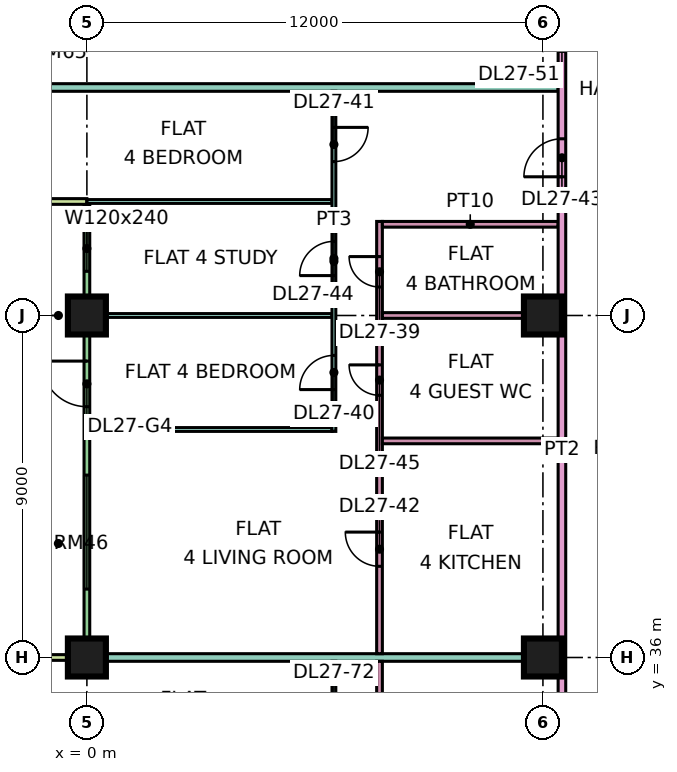
"""IFC4 building model, lengths in metres.
Left out: names, types, materials, properties, quantities, classifications, styles, units other than length and angle.
Written with IfcOpenShell. Run it as: python <this file> out.ifc"""

import sys

from ifc_helpers import new_model, si_unit, direction, frame, frame_2d, origin, origin_2d, place, context, subcontext, project, spatial, rectangle, extrude, element, fill, save


model = new_model("IFC4")
c1 = context("Model", 3, precision=1e-05, world=origin(), true_north=direction((0.0, 1.0)))
c2 = subcontext(c1, "Body", "Model", "MODEL_VIEW")
j1 = project(units=[si_unit("LENGTHUNIT", "METRE"), si_unit("PLANEANGLEUNIT", "RADIAN")], contexts=[c1])
p1 = place(None, origin())
s1 = spatial("IfcSite", under=j1, at=p1, CompositionType="ELEMENT")
p2 = place(p1, origin())
s2 = spatial("IfcBuilding", under=s1, at=p2, CompositionType="ELEMENT")
p3 = place(p2, frame((0.0, 0.0, 118.15)))
s3 = spatial("IfcBuildingStorey", under=s2, at=p3, CompositionType="ELEMENT", Elevation=118.15)
p4 = place(p3, frame((0.0, 36.0, 0.0), z_axis=(0.0, 0.0, 1.0), x_axis=(1.0, 0.0, 0.0)))
e1 = element("IfcColumn", 1, at=p4, inside=s3, PredefinedType="COLUMN", context=c2, shape_type="SweptSolid", body=[
    extrude(rectangle(XDim=1.0, YDim=1.0, at=origin_2d()), origin(), (0.0, 0.0, 1.0), 3.75),
])
for number, where, z_axis, x_axis in (
    (2, (0.0, 45.0, 0.0), (0.0, 0.0, 1.0), (1.0, 0.0, 0.0)),
    (3, (12.0, 36.0, 0.0), (0.0, 0.0, 1.0), (1.0, 0.0, 0.0)),
    (4, (12.0, 45.0, 0.0), (0.0, 0.0, 1.0), (1.0, 0.0, 0.0)),
):
    element("IfcColumn", number, at=place(p3, frame(where, z_axis=z_axis, x_axis=x_axis)), inside=s3, PredefinedType="COLUMN", context=c2, shape_type="SweptSolid", body=[
        extrude(rectangle(XDim=1.0, YDim=1.0, at=origin_2d()), origin(), (0.0, 0.0, 1.0), 3.75),
    ])
p5 = place(p3, frame((0.0, 47.925, 0.0), z_axis=(0.0, 0.0, 1.0), x_axis=(0.0, -1.0, 0.0)))
e5 = element("IfcWall", 5, at=p5, inside=s3, PredefinedType="SOLIDWALL", context=c2, shape_type="SweptSolid", body=[
    extrude(rectangle(XDim=11.85, YDim=0.15, at=frame_2d((5.925, 0.0))), origin(), (0.0, 0.0, 1.0), 3.35),
])
p6 = place(p5, frame((0.562, 0.0, 0.45)))
e6 = element("IfcOpeningElement", 6, at=p6, cuts=e5, PredefinedType="OPENING", context=c2, shape_type="SweptSolid", body=[
    extrude(rectangle(XDim=1.2, YDim=2.4, at=frame_2d((0.6, 1.2))), frame((0.0, 0.085, 0.0), z_axis=(0.0, -1.0, 0.0), x_axis=(1.0, 0.0, 0.0)), (0.0, 0.0, 1.0), 0.17),
])
p7 = place(p5, frame((4.125, 0.0, 0.0)))
e7 = element("IfcOpeningElement", 7, at=p7, cuts=e5, PredefinedType="OPENING", context=c2, shape_type="SweptSolid", body=[
    extrude(rectangle(XDim=1.2, YDim=2.4, at=frame_2d((0.6, 1.2))), frame((0.0, 0.085, 0.0), z_axis=(0.0, -1.0, 0.0), x_axis=(1.0, 0.0, 0.0)), (0.0, 0.0, 1.0), 0.17),
])
p8 = place(p5, frame((7.125, 0.0, 0.45)))
e8 = element("IfcOpeningElement", 8, at=p8, cuts=e5, PredefinedType="OPENING", context=c2, shape_type="SweptSolid", body=[
    extrude(rectangle(XDim=3.0, YDim=2.4, at=frame_2d((1.5, 1.2))), frame((0.0, 0.085, 0.0), z_axis=(0.0, -1.0, 0.0), x_axis=(1.0, 0.0, 0.0)), (0.0, 0.0, 1.0), 0.17),
])
for number, where, z_axis, x_axis in (
    (9, (-1.5, 48.0, 0.0), (0.0, 0.0, 1.0), (1.0, 0.0, 0.0)),
    (10, (-1.5, 36.0, 0.0), (0.0, 0.0, 1.0), (1.0, 0.0, 0.0)),
):
    element("IfcWall", number, at=place(p3, frame(where, z_axis=z_axis, x_axis=x_axis)), inside=s3, PredefinedType="SOLIDWALL", context=c2, shape_type="SweptSolid", body=[
        extrude(rectangle(XDim=1.5, YDim=0.15, at=frame_2d((0.75, 0.0))), origin(), (0.0, 0.0, 1.0), 3.35),
    ])
e11 = element("IfcWall", 11, at=p4, inside=s3, PredefinedType="PARTITIONING", context=c2, shape_type="SweptSolid", body=[
    extrude(rectangle(XDim=12.4, YDim=0.2, at=frame_2d((6.2, 0.0))), origin(), (0.0, 0.0, 1.0), 3.35),
])
p9 = place(p3, frame((0.0, 48.0, 0.0), z_axis=(0.0, 0.0, 1.0), x_axis=(1.0, 0.0, 0.0)))
e12 = element("IfcWall", 12, at=p9, inside=s3, PredefinedType="PARTITIONING", context=c2, shape_type="SweptSolid", body=[
    extrude(rectangle(XDim=6.45, YDim=0.1, at=frame_2d((3.225, 0.0))), origin(), (0.0, 0.0, 1.0), 3.35),
])
p10 = place(p3, frame((-1.35, 51.0, 0.0), z_axis=(0.0, 0.0, 1.0), x_axis=(1.0, 0.0, 0.0)))
e13 = element("IfcWall", 13, at=p10, inside=s3, PredefinedType="PARTITIONING", context=c2, shape_type="SweptSolid", body=[
    extrude(rectangle(XDim=13.75, YDim=0.2, at=frame_2d((6.875, 0.0))), origin(), (0.0, 0.0, 1.0), 3.35),
])
for number, where, z_axis, x_axis in (
    (14, (0.074, 42.0, 0.0), (0.0, 0.0, 1.0), (1.0, 0.0, 0.0)),
    (15, (0.074, 45.0, 0.0), (0.0, 0.0, 1.0), (1.0, 0.0, 0.0)),
):
    element("IfcWall", number, at=place(p3, frame(where, z_axis=z_axis, x_axis=x_axis)), inside=s3, PredefinedType="PARTITIONING", context=c2, shape_type="SweptSolid", body=[
        extrude(rectangle(XDim=6.376, YDim=0.1, at=frame_2d((3.188, 0.0))), origin(), (0.0, 0.0, 1.0), 3.35),
    ])
p11 = place(p3, frame((6.5, 30.05, 0.0), z_axis=(0.0, 0.0, 1.0), x_axis=(0.0, 1.0, 0.0)))
e16 = element("IfcWall", 16, at=p11, inside=s3, PredefinedType="PARTITIONING", context=c2, shape_type="SweptSolid", body=[
    extrude(rectangle(XDim=5.85, YDim=0.1, at=frame_2d((2.925, 0.0))), origin(), (0.0, 0.0, 1.0), 3.35),
])
p12 = place(p11, frame((1.0, 0.0, 0.0)))
e17 = element("IfcOpeningElement", 17, at=p12, cuts=e16, PredefinedType="OPENING", context=c2, shape_type="SweptSolid", body=[
    extrude(rectangle(XDim=0.9, YDim=2.1, at=frame_2d((0.45, 1.05))), frame((0.0, 0.06, 0.0), z_axis=(0.0, -1.0, 0.0), x_axis=(1.0, 0.0, 0.0)), (0.0, 0.0, 1.0), 0.12),
])
p13 = place(p11, frame((4.0, 0.0, 0.0)))
e18 = element("IfcOpeningElement", 18, at=p13, cuts=e16, PredefinedType="OPENING", context=c2, shape_type="SweptSolid", body=[
    extrude(rectangle(XDim=0.9, YDim=2.1, at=frame_2d((0.45, 1.05))), frame((0.0, 0.06, 0.0), z_axis=(0.0, -1.0, 0.0), x_axis=(1.0, 0.0, 0.0)), (0.0, 0.0, 1.0), 0.12),
])
p14 = place(p3, frame((6.5, 41.95, 0.0), z_axis=(0.0, 0.0, 1.0), x_axis=(0.0, 1.0, 0.0)))
e19 = element("IfcWall", 19, at=p14, inside=s3, PredefinedType="PARTITIONING", context=c2, shape_type="SweptSolid", body=[
    extrude(rectangle(XDim=8.95, YDim=0.1, at=frame_2d((4.475, 0.0))), origin(), (0.0, 0.0, 1.0), 3.35),
])
p15 = place(p14, frame((1.1, 0.0, 0.0)))
e20 = element("IfcOpeningElement", 20, at=p15, cuts=e19, PredefinedType="OPENING", context=c2, shape_type="SweptSolid", body=[
    extrude(rectangle(XDim=0.9, YDim=2.1, at=frame_2d((0.45, 1.05))), frame((0.0, 0.06, 0.0), z_axis=(0.0, -1.0, 0.0), x_axis=(1.0, 0.0, 0.0)), (0.0, 0.0, 1.0), 0.12),
])
p16 = place(p14, frame((7.1, 0.0, 0.0)))
e21 = element("IfcOpeningElement", 21, at=p16, cuts=e19, PredefinedType="OPENING", context=c2, shape_type="SweptSolid", body=[
    extrude(rectangle(XDim=0.9, YDim=2.1, at=frame_2d((0.45, 1.05))), frame((0.0, 0.06, 0.0), z_axis=(0.0, -1.0, 0.0), x_axis=(1.0, 0.0, 0.0)), (0.0, 0.0, 1.0), 0.12),
])
p17 = place(p14, frame((4.1, 0.0, 0.0)))
e22 = element("IfcOpeningElement", 22, at=p17, cuts=e19, PredefinedType="OPENING", context=c2, shape_type="SweptSolid", body=[
    extrude(rectangle(XDim=0.9, YDim=2.1, at=frame_2d((0.45, 1.05))), frame((0.0, 0.06, 0.0), z_axis=(0.0, -1.0, 0.0), x_axis=(1.0, 0.0, 0.0)), (0.0, 0.0, 1.0), 0.12),
])
p18 = place(p3, frame((7.7, 26.625, 0.0), z_axis=(0.0, 0.0, 1.0), x_axis=(0.0, 1.0, 0.0)))
e23 = element("IfcWall", 23, at=p18, inside=s3, PredefinedType="PARTITIONING", context=c2, shape_type="SweptSolid", body=[
    extrude(rectangle(XDim=9.275, YDim=0.15, at=frame_2d((4.637, 0.0))), origin(), (0.0, 0.0, 1.0), 3.35),
])
p19 = place(p18, frame((1.275, 0.0, 0.0)))
e24 = element("IfcOpeningElement", 24, at=p19, cuts=e23, PredefinedType="OPENING", context=c2, shape_type="SweptSolid", body=[
    extrude(rectangle(XDim=0.8, YDim=2.1, at=frame_2d((0.4, 1.05))), frame((0.0, 0.085, 0.0), z_axis=(0.0, -1.0, 0.0), x_axis=(1.0, 0.0, 0.0)), (0.0, 0.0, 1.0), 0.17),
])
p20 = place(p18, frame((5.925, 0.0, 0.0)))
e25 = element("IfcOpeningElement", 25, at=p20, cuts=e23, PredefinedType="OPENING", context=c2, shape_type="SweptSolid", body=[
    extrude(rectangle(XDim=0.9, YDim=2.1, at=frame_2d((0.45, 1.05))), frame((0.0, 0.085, 0.0), z_axis=(0.0, -1.0, 0.0), x_axis=(1.0, 0.0, 0.0)), (0.0, 0.0, 1.0), 0.17),
])
p21 = place(p3, frame((7.7, 36.1, 0.0), z_axis=(0.0, 0.0, 1.0), x_axis=(0.0, 1.0, 0.0)))
e26 = element("IfcWall", 26, at=p21, inside=s3, PredefinedType="PARTITIONING", context=c2, shape_type="SweptSolid", body=[
    extrude(rectangle(XDim=11.375, YDim=0.15, at=frame_2d((5.688, 0.0))), origin(), (0.0, 0.0, 1.0), 3.35),
])
p22 = place(p21, frame((9.65, 0.0, 0.0)))
e27 = element("IfcOpeningElement", 27, at=p22, cuts=e26, PredefinedType="OPENING", context=c2, shape_type="SweptSolid", body=[
    extrude(rectangle(XDim=0.8, YDim=2.1, at=frame_2d((0.4, 1.05))), frame((0.0, 0.085, 0.0), z_axis=(0.0, -1.0, 0.0), x_axis=(1.0, 0.0, 0.0)), (0.0, 0.0, 1.0), 0.17),
])
p23 = place(p21, frame((2.3, 0.0, 0.0)))
e28 = element("IfcOpeningElement", 28, at=p23, cuts=e26, PredefinedType="OPENING", context=c2, shape_type="SweptSolid", body=[
    extrude(rectangle(XDim=0.9, YDim=2.1, at=frame_2d((0.45, 1.05))), frame((0.0, 0.085, 0.0), z_axis=(0.0, -1.0, 0.0), x_axis=(1.0, 0.0, 0.0)), (0.0, 0.0, 1.0), 0.17),
])
p24 = place(p21, frame((6.8, 0.0, 0.0)))
e29 = element("IfcOpeningElement", 29, at=p24, cuts=e26, PredefinedType="OPENING", context=c2, shape_type="SweptSolid", body=[
    extrude(rectangle(XDim=0.8, YDim=2.1, at=frame_2d((0.4, 1.05))), frame((0.0, 0.085, 0.0), z_axis=(0.0, -1.0, 0.0), x_axis=(1.0, 0.0, 0.0)), (0.0, 0.0, 1.0), 0.17),
])
for number, where, z_axis, x_axis in (
    (30, (7.775, 41.7, 0.0), (0.0, 0.0, 1.0), (1.0, 0.0, 0.0)),
    (31, (7.775, 45.0, 0.0), (0.0, 0.0, 1.0), (1.0, 0.0, 0.0)),
    (32, (7.775, 47.4, 0.0), (0.0, 0.0, 1.0), (1.0, 0.0, 0.0)),
):
    element("IfcWall", number, at=place(p3, frame(where, z_axis=z_axis, x_axis=x_axis)), inside=s3, PredefinedType="PARTITIONING", context=c2, shape_type="SweptSolid", body=[
        extrude(rectangle(XDim=4.625, YDim=0.15, at=frame_2d((2.312, 0.0))), origin(), (0.0, 0.0, 1.0), 3.35),
    ])
p25 = place(p3, frame((12.5, 20.0, 0.0), z_axis=(0.0, 0.0, 1.0), x_axis=(0.0, 1.0, 0.0)))
e33 = element("IfcWall", 33, at=p25, inside=s3, PredefinedType="PARTITIONING", context=c2, shape_type="SweptSolid", body=[
    extrude(rectangle(XDim=42.926, YDim=0.2, at=frame_2d((21.463, 0.0))), origin(), (0.0, 0.0, 1.0), 3.35),
])
p26 = place(p25, frame((28.65, 0.0, 0.0)))
e34 = element("IfcOpeningElement", 34, at=p26, cuts=e33, PredefinedType="OPENING", context=c2, shape_type="SweptSolid", body=[
    extrude(rectangle(XDim=1.0, YDim=2.1, at=frame_2d((0.5, 1.05))), frame((0.0, 0.11, 0.0), z_axis=(0.0, -1.0, 0.0), x_axis=(1.0, 0.0, 0.0)), (0.0, 0.0, 1.0), 0.22),
])
p27 = place(p25, frame((31.95, 0.0, 0.0)))
e35 = element("IfcOpeningElement", 35, at=p27, cuts=e33, PredefinedType="OPENING", context=c2, shape_type="SweptSolid", body=[
    extrude(rectangle(XDim=1.0, YDim=2.1, at=frame_2d((0.5, 1.05))), frame((0.0, 0.11, 0.0), z_axis=(0.0, -1.0, 0.0), x_axis=(1.0, 0.0, 0.0)), (0.0, 0.0, 1.0), 0.22),
])
p28 = place(p25, frame((0.6, 0.0, 0.0)))
e36 = element("IfcOpeningElement", 36, at=p28, cuts=e33, PredefinedType="OPENING", context=c2, shape_type="SweptSolid", body=[
    extrude(rectangle(XDim=1.2, YDim=2.1, at=frame_2d((0.6, 1.05))), frame((0.0, 0.11, 0.0), z_axis=(0.0, -1.0, 0.0), x_axis=(1.0, 0.0, 0.0)), (0.0, 0.0, 1.0), 0.22),
])
p29 = place(p25, frame((4.65, 0.0, 0.0)))
e37 = element("IfcOpeningElement", 37, at=p29, cuts=e33, PredefinedType="OPENING", context=c2, shape_type="SweptSolid", body=[
    extrude(rectangle(XDim=1.0, YDim=2.1, at=frame_2d((0.5, 1.05))), frame((0.0, 0.11, 0.0), z_axis=(0.0, -1.0, 0.0), x_axis=(1.0, 0.0, 0.0)), (0.0, 0.0, 1.0), 0.22),
])
p30 = place(p6, origin())
e38 = element("IfcWindow", 38, at=p30, inside=s3, PartitioningType="SINGLE_PANEL", PredefinedType="WINDOW", context=c2, shape_type="SweptSolid", body=[
    extrude(rectangle(XDim=1.2, YDim=2.4, at=frame_2d((0.6, 1.2))), frame((0.0, 0.03, 0.0), z_axis=(0.0, -1.0, 0.0), x_axis=(1.0, 0.0, 0.0)), (0.0, 0.0, 1.0), 0.06),
])
fill(e6, e38)
p31 = place(p7, frame((1.2, 0.0, 0.0), z_axis=(0.0, 0.0, 1.0), x_axis=(-1.0, 0.0, 0.0)))
e39 = element("IfcDoor", 39, at=p31, inside=s3, OperationType="DOUBLE_DOOR_SINGLE_SWING", PredefinedType="DOOR", context=c2, shape_type="SweptSolid", body=[
    extrude(rectangle(XDim=1.2, YDim=2.4, at=frame_2d((0.6, 1.2))), frame((0.0, 0.025, 0.0), z_axis=(0.0, -1.0, 0.0), x_axis=(1.0, 0.0, 0.0)), (0.0, 0.0, 1.0), 0.05),
])
fill(e7, e39)
p32 = place(p8, origin())
e40 = element("IfcWindow", 40, at=p32, inside=s3, PartitioningType="SINGLE_PANEL", PredefinedType="WINDOW", context=c2, shape_type="SweptSolid", body=[
    extrude(rectangle(XDim=3.0, YDim=2.4, at=frame_2d((1.5, 1.2))), frame((0.0, 0.03, 0.0), z_axis=(0.0, -1.0, 0.0), x_axis=(1.0, 0.0, 0.0)), (0.0, 0.0, 1.0), 0.06),
])
fill(e8, e40)
p33 = place(p22, frame((0.8, 0.0, 0.0), z_axis=(0.0, 0.0, 1.0), x_axis=(-1.0, 0.0, 0.0)))
e41 = element("IfcDoor", 41, at=p33, inside=s3, OperationType="SINGLE_SWING_RIGHT", PredefinedType="DOOR", context=c2, shape_type="SweptSolid", body=[
    extrude(rectangle(XDim=0.8, YDim=2.1, at=frame_2d((0.4, 1.05))), frame((0.0, 0.025, 0.0), z_axis=(0.0, -1.0, 0.0), x_axis=(1.0, 0.0, 0.0)), (0.0, 0.0, 1.0), 0.05),
])
fill(e27, e41)
p34 = place(p15, origin())
e42 = element("IfcDoor", 42, at=p34, inside=s3, OperationType="SINGLE_SWING_LEFT", PredefinedType="DOOR", context=c2, shape_type="SweptSolid", body=[
    extrude(rectangle(XDim=0.9, YDim=2.1, at=frame_2d((0.45, 1.05))), frame((0.0, 0.025, 0.0), z_axis=(0.0, -1.0, 0.0), x_axis=(1.0, 0.0, 0.0)), (0.0, 0.0, 1.0), 0.05),
])
fill(e20, e42)
p35 = place(p16, origin())
e43 = element("IfcDoor", 43, at=p35, inside=s3, OperationType="SINGLE_SWING_RIGHT", PredefinedType="DOOR", context=c2, shape_type="SweptSolid", body=[
    extrude(rectangle(XDim=0.9, YDim=2.1, at=frame_2d((0.45, 1.05))), frame((0.0, 0.025, 0.0), z_axis=(0.0, -1.0, 0.0), x_axis=(1.0, 0.0, 0.0)), (0.0, 0.0, 1.0), 0.05),
])
fill(e21, e43)
p36 = place(p23, frame((0.9, 0.0, 0.0), z_axis=(0.0, 0.0, 1.0), x_axis=(-1.0, 0.0, 0.0)))
e44 = element("IfcDoor", 44, at=p36, inside=s3, OperationType="SINGLE_SWING_RIGHT", PredefinedType="DOOR", context=c2, shape_type="SweptSolid", body=[
    extrude(rectangle(XDim=0.9, YDim=2.1, at=frame_2d((0.45, 1.05))), frame((0.0, 0.025, 0.0), z_axis=(0.0, -1.0, 0.0), x_axis=(1.0, 0.0, 0.0)), (0.0, 0.0, 1.0), 0.05),
])
fill(e28, e44)
p37 = place(p26, origin())
e45 = element("IfcDoor", 45, at=p37, inside=s3, OperationType="SINGLE_SWING_LEFT", PredefinedType="DOOR", context=c2, shape_type="SweptSolid", body=[
    extrude(rectangle(XDim=1.0, YDim=2.1, at=frame_2d((0.5, 1.05))), frame((0.0, 0.025, 0.0), z_axis=(0.0, -1.0, 0.0), x_axis=(1.0, 0.0, 0.0)), (0.0, 0.0, 1.0), 0.05),
])
fill(e34, e45)
p38 = place(p17, origin())
e46 = element("IfcDoor", 46, at=p38, inside=s3, OperationType="SINGLE_SWING_LEFT", PredefinedType="DOOR", context=c2, shape_type="SweptSolid", body=[
    extrude(rectangle(XDim=0.9, YDim=2.1, at=frame_2d((0.45, 1.05))), frame((0.0, 0.025, 0.0), z_axis=(0.0, -1.0, 0.0), x_axis=(1.0, 0.0, 0.0)), (0.0, 0.0, 1.0), 0.05),
])
fill(e22, e46)
p39 = place(p24, frame((0.8, 0.0, 0.0), z_axis=(0.0, 0.0, 1.0), x_axis=(-1.0, 0.0, 0.0)))
e47 = element("IfcDoor", 47, at=p39, inside=s3, OperationType="SINGLE_SWING_RIGHT", PredefinedType="DOOR", context=c2, shape_type="SweptSolid", body=[
    extrude(rectangle(XDim=0.8, YDim=2.1, at=frame_2d((0.4, 1.05))), frame((0.0, 0.025, 0.0), z_axis=(0.0, -1.0, 0.0), x_axis=(1.0, 0.0, 0.0)), (0.0, 0.0, 1.0), 0.05),
])
fill(e29, e47)
save(model, sys.argv[1])
